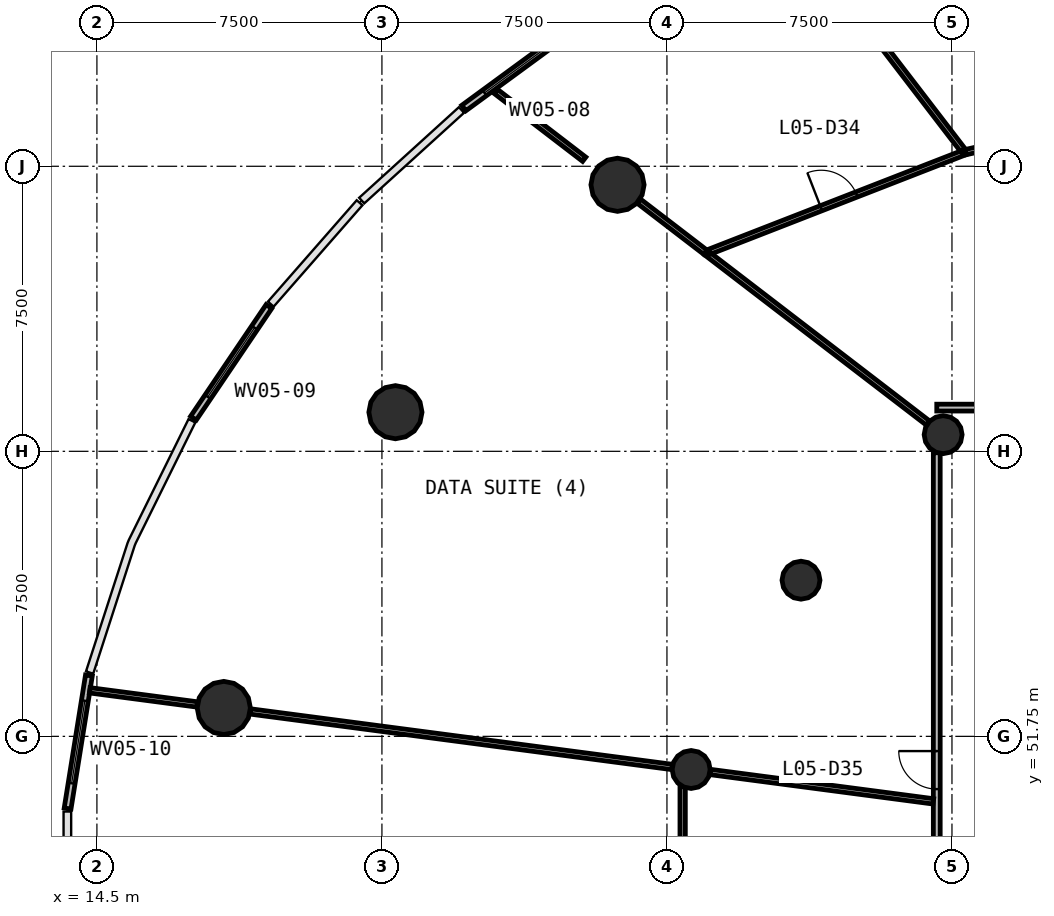
"""IFC4 building model, lengths in metres.
Left out: names, types, materials, properties, quantities, classifications, styles, units other than length and angle.
Written with IfcOpenShell. Run it as: python <this file> out.ifc"""

import sys

from ifc_helpers import new_model, si_unit, direction, frame, frame_2d, origin, origin_2d, place, context, subcontext, project, spatial, rectangle, circle, extrude, source, transform, mapped, element, fill, save


model = new_model("IFC4")
c1 = context("Model", 3, precision=1e-05, world=origin(), true_north=direction((0.0, 1.0)))
c2 = subcontext(c1, "Body", "Model", "MODEL_VIEW")
j1 = project(units=[si_unit("LENGTHUNIT", "METRE"), si_unit("PLANEANGLEUNIT", "RADIAN")], contexts=[c1])
p1 = place(None, origin())
s1 = spatial("IfcSite", under=j1, at=p1, CompositionType="ELEMENT")
p2 = place(p1, origin())
s2 = spatial("IfcBuilding", under=s1, at=p2, CompositionType="ELEMENT")
p3 = place(p2, frame((0.0, 0.0, 22.6)))
s3 = spatial("IfcBuildingStorey", under=s2, at=p3, CompositionType="ELEMENT", Elevation=22.6)
m1 = source(origin(), c2, "Body", "SweptSolid", [
    extrude(circle(Radius=0.7, at=origin_2d()), origin(), (0.0, 0.0, 1.0), 4.4),
])
for number, where, z_axis, x_axis in (
    (1, (28.199, 66.263, 0.0), (0.0, 0.0, 1.0), (1.0, 0.0, 0.0)),
    (2, (22.355, 60.279, 0.0), (0.0, 0.0, 1.0), (1.0, 0.0, 0.0)),
    (3, (17.839, 52.497, 0.0), (0.0, 0.0, 1.0), (1.0, 0.0, 0.0)),
):
    element("IfcColumn", number, at=place(p3, frame(where, z_axis=z_axis, x_axis=x_axis)), inside=s3, PredefinedType="COLUMN", context=c2, shape_type="MappedRepresentation", body=[
        mapped(m1, transform((0.0, 0.0, 0.0), scale=1.0)),
    ])
m2 = source(origin(), c2, "Body", "SweptSolid", [
    extrude(circle(Radius=0.5, at=origin_2d()), origin(), (0.0, 0.0, 1.0), 4.4),
])
for number, where, z_axis, x_axis in (
    (4, (36.768, 59.688, 0.0), (0.0, 0.0, 1.0), (1.0, 0.0, 0.0)),
    (5, (33.028, 55.859, 0.0), (0.0, 0.0, 1.0), (1.0, 0.0, 0.0)),
    (6, (30.137, 50.878, 0.0), (0.0, 0.0, 1.0), (1.0, 0.0, 0.0)),
):
    element("IfcColumn", number, at=place(p3, frame(where, z_axis=z_axis, x_axis=x_axis)), inside=s3, PredefinedType="COLUMN", context=c2, shape_type="MappedRepresentation", body=[
        mapped(m2, transform((0.0, 0.0, 0.0), scale=1.0)),
    ])
p4 = place(p3, frame((27.016, 70.379, 0.0), z_axis=(0.0, 0.0, 1.0), x_axis=(-0.806584417143, -0.591118920373, 0.0)))
e7 = element("IfcWall", 7, at=p4, inside=s3, PredefinedType="STANDARD", context=c2, shape_type="SweptSolid", body=[
    extrude(rectangle(XDim=3.547, YDim=0.18, at=frame_2d((1.773, 0.0))), origin(), (0.0, 0.0, 1.0), 3.95),
])
p5 = place(p4, frame((0.673, 0.0, 0.9)))
e8 = element("IfcOpeningElement", 8, at=p5, cuts=e7, PredefinedType="OPENING", context=c2, shape_type="SweptSolid", body=[
    extrude(rectangle(XDim=2.2, YDim=2.2, at=frame_2d((1.1, 1.1))), frame((0.0, 0.1, 0.0), z_axis=(0.0, -1.0, 0.0), x_axis=(1.0, 0.0, 0.0)), (0.0, 0.0, 1.0), 0.2),
])
p6 = place(p3, frame((19.027, 63.06, 0.0), z_axis=(0.0, 0.0, 1.0), x_axis=(-0.560217664382, -0.828345440329, 0.0)))
e9 = element("IfcWall", 9, at=p6, inside=s3, PredefinedType="STANDARD", context=c2, shape_type="SweptSolid", body=[
    extrude(rectangle(XDim=3.546, YDim=0.18, at=frame_2d((1.773, 0.0))), origin(), (0.0, 0.0, 1.0), 3.95),
])
p7 = place(p6, frame((0.673, 0.0, 0.9)))
e10 = element("IfcOpeningElement", 10, at=p7, cuts=e9, PredefinedType="OPENING", context=c2, shape_type="SweptSolid", body=[
    extrude(rectangle(XDim=2.2, YDim=2.2, at=frame_2d((1.1, 1.1))), frame((0.0, 0.1, 0.0), z_axis=(0.0, -1.0, 0.0), x_axis=(1.0, 0.0, 0.0)), (0.0, 0.0, 1.0), 0.2),
])
p8 = place(p3, frame((14.29, 53.352, 0.0), z_axis=(0.0, 0.0, 1.0), x_axis=(-0.15821884536, -0.987404069757, 0.0)))
e11 = element("IfcWall", 11, at=p8, inside=s3, PredefinedType="STANDARD", context=c2, shape_type="SweptSolid", body=[
    extrude(rectangle(XDim=3.544, YDim=0.18, at=frame_2d((1.772, 0.0))), origin(), (0.0, 0.0, 1.0), 3.95),
])
p9 = place(p8, frame((0.672, 0.0, 0.9)))
e12 = element("IfcOpeningElement", 12, at=p9, cuts=e11, PredefinedType="OPENING", context=c2, shape_type="SweptSolid", body=[
    extrude(rectangle(XDim=2.2, YDim=2.2, at=frame_2d((1.1, 1.1))), frame((0.0, 0.1, 0.0), z_axis=(0.0, -1.0, 0.0), x_axis=(1.0, 0.0, 0.0)), (0.0, 0.0, 1.0), 0.2),
])
p10 = place(p3, frame((36.6, 60.4, 0.0), z_axis=(0.0, 0.0, 1.0), x_axis=(1.0, 0.0, 0.0)))
e13 = element("IfcWall", 13, at=p10, inside=s3, PredefinedType="PARTITIONING", context=c2, shape_type="SweptSolid", body=[
    extrude(rectangle(XDim=30.8, YDim=0.18, at=frame_2d((15.4, 0.0))), origin(), (0.0, 0.0, 1.0), 3.05),
])
p11 = place(p10, frame((25.45, 0.0, 0.0)))
e14 = element("IfcOpeningElement", 14, at=p11, cuts=e13, PredefinedType="OPENING", context=c2, shape_type="SweptSolid", body=[
    extrude(rectangle(XDim=0.9, YDim=2.1, at=frame_2d((0.45, 1.05))), frame((0.0, 0.1, 0.0), z_axis=(0.0, -1.0, 0.0), x_axis=(1.0, 0.0, 0.0)), (0.0, 0.0, 1.0), 0.2),
])
p12 = place(p10, frame((14.95, 0.0, 0.0)))
e15 = element("IfcOpeningElement", 15, at=p12, cuts=e13, PredefinedType="OPENING", context=c2, shape_type="SweptSolid", body=[
    extrude(rectangle(XDim=1.0, YDim=2.1, at=frame_2d((0.5, 1.05))), frame((0.0, 0.1, 0.0), z_axis=(0.0, -1.0, 0.0), x_axis=(1.0, 0.0, 0.0)), (0.0, 0.0, 1.0), 0.2),
])
p13 = place(p10, frame((8.95, 0.0, 0.0)))
e16 = element("IfcOpeningElement", 16, at=p13, cuts=e13, PredefinedType="OPENING", context=c2, shape_type="SweptSolid", body=[
    extrude(rectangle(XDim=1.0, YDim=2.1, at=frame_2d((0.5, 1.05))), frame((0.0, 0.1, 0.0), z_axis=(0.0, -1.0, 0.0), x_axis=(1.0, 0.0, 0.0)), (0.0, 0.0, 1.0), 0.2),
])
p14 = place(p3, frame((36.6, 35.63, 0.0), z_axis=(0.0, 0.0, 1.0), x_axis=(0.0, 1.0, 0.0)))
e17 = element("IfcWall", 17, at=p14, inside=s3, PredefinedType="PARTITIONING", context=c2, shape_type="SweptSolid", body=[
    extrude(rectangle(XDim=23.583, YDim=0.18, at=frame_2d((11.791, 0.0))), origin(), (0.0, 0.0, 1.0), 3.05),
])
p15 = place(p14, frame((14.732, 0.0, 0.0)))
e18 = element("IfcOpeningElement", 18, at=p15, cuts=e17, PredefinedType="OPENING", context=c2, shape_type="SweptSolid", body=[
    extrude(rectangle(XDim=1.0, YDim=2.1, at=frame_2d((0.5, 1.05))), frame((0.0, 0.1, 0.0), z_axis=(0.0, -1.0, 0.0), x_axis=(1.0, 0.0, 0.0)), (0.0, 0.0, 1.0), 0.2),
])
p16 = place(p14, frame((11.333, 0.0, 0.0)))
e19 = element("IfcOpeningElement", 19, at=p16, cuts=e17, PredefinedType="OPENING", context=c2, shape_type="SweptSolid", body=[
    extrude(rectangle(XDim=1.0, YDim=2.1, at=frame_2d((0.5, 1.05))), frame((0.0, 0.1, 0.0), z_axis=(0.0, -1.0, 0.0), x_axis=(1.0, 0.0, 0.0)), (0.0, 0.0, 1.0), 0.2),
])
p17 = place(p3, frame((29.637, 50.944, 0.0), z_axis=(0.0, 0.0, 1.0), x_axis=(-0.991443306772, 0.130538000051, 0.0)))
e20 = element("IfcWall", 20, at=p17, inside=s3, PredefinedType="PARTITIONING", context=c2, shape_type="SweptSolid", body=[
    extrude(rectangle(XDim=11.195, YDim=0.14, at=frame_2d((5.598, 0.0))), origin(), (0.0, 0.0, 1.0), 3.05),
])
p18 = place(p3, frame((36.367, 59.995, 0.0), z_axis=(0.0, 0.0, 1.0), x_axis=(-0.793358203631, 0.608755090928, 0.0)))
e21 = element("IfcWall", 21, at=p18, inside=s3, PredefinedType="PARTITIONING", context=c2, shape_type="SweptSolid", body=[
    extrude(rectangle(XDim=7.349, YDim=0.14, at=frame_2d((3.675, 0.0))), origin(), (0.0, 0.0, 1.0), 3.05),
])
p19 = place(p3, frame((30.613, 64.499, 0.0), z_axis=(0.0, 0.0, 1.0), x_axis=(0.931844457787, 0.362857970137, 0.0)))
e22 = element("IfcWall", 22, at=p19, inside=s3, PredefinedType="PARTITIONING", context=c2, shape_type="SweptSolid", body=[
    extrude(rectangle(XDim=7.211, YDim=0.14, at=frame_2d((3.605, 0.0))), origin(), (0.0, 0.0, 1.0), 3.05),
])
p20 = place(p19, frame((3.161, 0.0, 0.0)))
e23 = element("IfcOpeningElement", 23, at=p20, cuts=e22, PredefinedType="OPENING", context=c2, shape_type="SweptSolid", body=[
    extrude(rectangle(XDim=1.0, YDim=2.1, at=frame_2d((0.5, 1.05))), frame((0.0, 0.08, 0.0), z_axis=(0.0, -1.0, 0.0), x_axis=(1.0, 0.0, 0.0)), (0.0, 0.0, 1.0), 0.16),
])
p21 = place(p3, frame((37.361, 67.122, 0.0), z_axis=(0.0, 0.0, 1.0), x_axis=(0.975258757594, 0.221066405717, 0.0)))
e24 = element("IfcWall", 24, at=p21, inside=s3, PredefinedType="PARTITIONING", context=c2, shape_type="SweptSolid", body=[
    extrude(rectangle(XDim=6.297, YDim=0.14, at=frame_2d((3.148, 0.0))), origin(), (0.0, 0.0, 1.0), 3.05),
])
p22 = place(p21, frame((2.647, 0.0, 0.0)))
e25 = element("IfcOpeningElement", 25, at=p22, cuts=e24, PredefinedType="OPENING", context=c2, shape_type="SweptSolid", body=[
    extrude(rectangle(XDim=1.0, YDim=2.1, at=frame_2d((0.5, 1.05))), frame((0.0, 0.08, 0.0), z_axis=(0.0, -1.0, 0.0), x_axis=(1.0, 0.0, 0.0)), (0.0, 0.0, 1.0), 0.16),
])
p23 = place(p3, frame((36.51, 50.039, 0.0), z_axis=(0.0, 0.0, 1.0), x_axis=(-0.991445034615, 0.130524876315, 0.0)))
e26 = element("IfcWall", 26, at=p23, inside=s3, PredefinedType="PARTITIONING", context=c2, shape_type="SweptSolid", body=[
    extrude(rectangle(XDim=5.924, YDim=0.14, at=frame_2d((2.962, 0.0))), origin(), (0.0, 0.0, 1.0), 3.05),
])
p24 = place(p3, frame((29.913, 50.426, 0.0), z_axis=(0.0, 0.0, 1.0), x_axis=(0.0, -1.0, 0.0)))
e27 = element("IfcWall", 27, at=p24, inside=s3, PredefinedType="PARTITIONING", context=c2, shape_type="SweptSolid", body=[
    extrude(rectangle(XDim=5.304, YDim=0.14, at=frame_2d((2.652, 0.0))), origin(), (0.0, 0.0, 1.0), 3.05),
])
p25 = place(p3, frame((37.288, 67.173, 0.0), z_axis=(0.0, 0.0, 1.0), x_axis=(-0.608786962905, 0.79333374679, 0.0)))
e28 = element("IfcWall", 28, at=p25, inside=s3, PredefinedType="PARTITIONING", context=c2, shape_type="SweptSolid", body=[
    extrude(rectangle(XDim=3.706, YDim=0.14, at=frame_2d((1.853, 0.0))), origin(), (0.0, 0.0, 1.0), 3.05),
])
p26 = place(p3, frame((27.323, 66.935, 0.0), z_axis=(0.0, 0.0, 1.0), x_axis=(-0.793378830646, 0.608728207892, 0.0)))
e29 = element("IfcWall", 29, at=p26, inside=s3, PredefinedType="PARTITIONING", context=c2, shape_type="SweptSolid", body=[
    extrude(rectangle(XDim=2.919, YDim=0.14, at=frame_2d((1.46, 0.0))), origin(), (0.0, 0.0, 1.0), 3.05),
])
p27 = place(p3, frame((17.141, 52.589, 0.0), z_axis=(0.0, 0.0, 1.0), x_axis=(-0.991443227873, 0.130538599287, 0.0)))
e30 = element("IfcWall", 30, at=p27, inside=s3, PredefinedType="PARTITIONING", context=c2, shape_type="SweptSolid", body=[
    extrude(rectangle(XDim=2.854, YDim=0.14, at=frame_2d((1.427, 0.0))), origin(), (0.0, 0.0, 1.0), 3.05),
])
p28 = place(p3, frame((30.513, 64.488, 0.0), z_axis=(0.0, 0.0, 1.0), x_axis=(-0.793382466046, 0.608723469706, 0.0)))
e31 = element("IfcWall", 31, at=p28, inside=s3, PredefinedType="PARTITIONING", context=c2, shape_type="SweptSolid", body=[
    extrude(rectangle(XDim=2.212, YDim=0.14, at=frame_2d((1.106, 0.0))), origin(), (0.0, 0.0, 1.0), 3.05),
])
m3 = source(origin(), c2, "Body", "SweptSolid", [
    extrude(rectangle(XDim=2.2, YDim=2.2, at=frame_2d((1.1, 1.1))), frame((0.0, 0.03, 0.0), z_axis=(0.0, -1.0, 0.0), x_axis=(1.0, 0.0, 0.0)), (0.0, 0.0, 1.0), 0.06),
])
p29 = place(p5, origin())
e32 = element("IfcWindow", 32, at=p29, inside=s3, PartitioningType="SINGLE_PANEL", PredefinedType="WINDOW", context=c2, shape_type="MappedRepresentation", body=[
    mapped(m3, transform((0.0, 0.0, 0.0), scale=1.0)),
])
fill(e8, e32)
p30 = place(p7, origin())
e33 = element("IfcWindow", 33, at=p30, inside=s3, PartitioningType="SINGLE_PANEL", PredefinedType="WINDOW", context=c2, shape_type="MappedRepresentation", body=[
    mapped(m3, transform((0.0, 0.0, 0.0), scale=1.0)),
])
fill(e10, e33)
p31 = place(p9, origin())
e34 = element("IfcWindow", 34, at=p31, inside=s3, PartitioningType="SINGLE_PANEL", PredefinedType="WINDOW", context=c2, shape_type="MappedRepresentation", body=[
    mapped(m3, transform((0.0, 0.0, 0.0), scale=1.0)),
])
fill(e12, e34)
m4 = source(origin(), c2, "Body", "SweptSolid", [
    extrude(rectangle(XDim=1.0, YDim=2.1, at=frame_2d((0.5, 1.05))), frame((0.0, 0.025, 0.0), z_axis=(0.0, -1.0, 0.0), x_axis=(1.0, 0.0, 0.0)), (0.0, 0.0, 1.0), 0.05),
])
p32 = place(p20, origin())
e35 = element("IfcDoor", 35, at=p32, inside=s3, OperationType="SINGLE_SWING_LEFT", PredefinedType="DOOR", context=c2, shape_type="MappedRepresentation", body=[
    mapped(m4, transform((0.0, 0.0, 0.0), scale=1.0)),
])
fill(e23, e35)
p33 = place(p15, origin())
e36 = element("IfcDoor", 36, at=p33, inside=s3, OperationType="SINGLE_SWING_RIGHT", PredefinedType="DOOR", context=c2, shape_type="MappedRepresentation", body=[
    mapped(m4, transform((0.0, 0.0, 0.0), scale=1.0)),
])
fill(e18, e36)
save(model, sys.argv[1])
